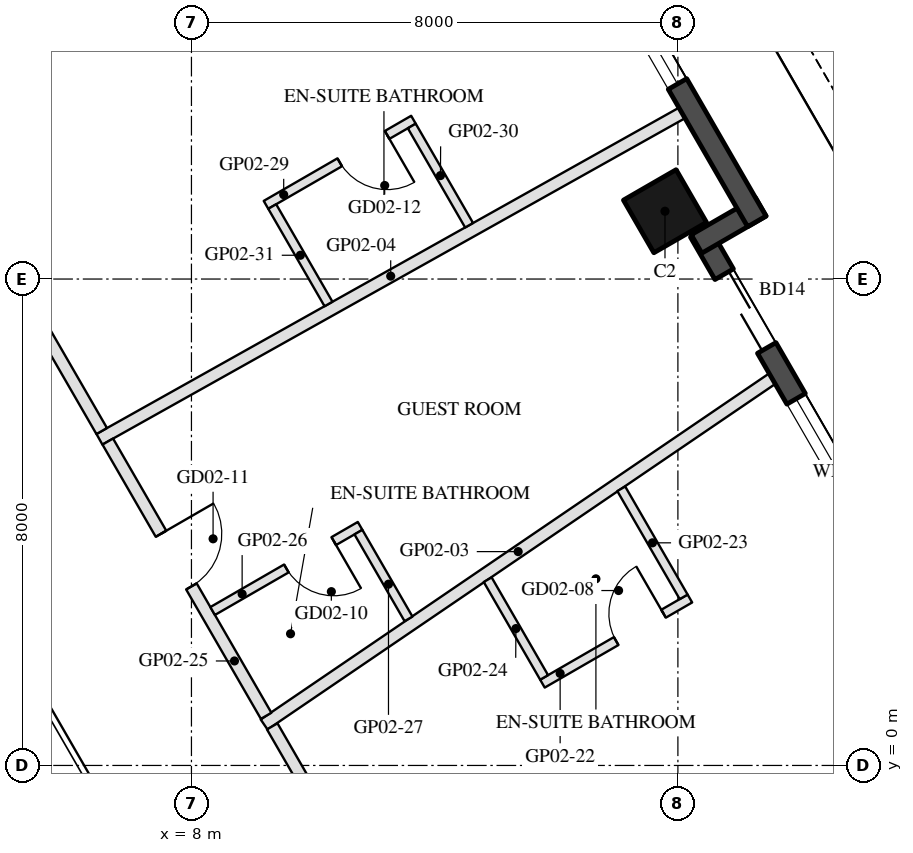
"""IFC4 building model, lengths in metres.
Left out: names, types, materials, properties, quantities, classifications, styles, units other than length and angle.
Written with IfcOpenShell. Run it as: python <this file> out.ifc"""

import sys

from ifc_helpers import new_model, si_unit, direction, frame, frame_2d, origin, origin_2d, place, context, subcontext, project, spatial, rectangle, hollow_rectangle, extrude, element, fill, save


model = new_model("IFC4")
c1 = context("Model", 3, precision=1e-05, world=origin(), true_north=direction((0.0, 1.0)))
c2 = subcontext(c1, "Body", "Model", "MODEL_VIEW")
j1 = project(units=[si_unit("LENGTHUNIT", "METRE"), si_unit("PLANEANGLEUNIT", "RADIAN")], contexts=[c1])
p1 = place(None, origin())
s1 = spatial("IfcSite", under=j1, at=p1, CompositionType="ELEMENT")
p2 = place(p1, origin())
s2 = spatial("IfcBuilding", under=s1, at=p2, CompositionType="ELEMENT")
p3 = place(p2, frame((0.0, 0.0, 57.6)))
s3 = spatial("IfcBuildingStorey", under=s2, at=p3, CompositionType="ELEMENT", Elevation=57.6)
p4 = place(p3, frame((15.788, 9.115, 0.0), z_axis=(0.0, 0.0, 1.0), x_axis=(-0.5, 0.866025403784, 0.0)))
e1 = element("IfcColumn", 1, at=p4, inside=s3, PredefinedType="COLUMN", context=c2, shape_type="SweptSolid", body=[
    extrude(hollow_rectangle(XDim=1.0, YDim=1.0, WallThickness=0.045, at=origin_2d()), origin(), (0.0, 0.0, 1.0), 3.7),
])
p5 = place(p3, frame((19.729, 2.938, 0.0), z_axis=(0.0, 0.0, 1.0), x_axis=(-0.499976430342, 0.866039011305, 0.0)))
e2 = element("IfcWall", 2, at=p5, inside=s3, PredefinedType="SOLIDWALL", context=c2, shape_type="SweptSolid", body=[
    extrude(rectangle(XDim=6.74, YDim=0.35, at=frame_2d((3.37, 0.0))), origin(), (0.0, 0.0, 1.0), 3.55),
])
p6 = place(p5, frame((0.77, 0.0, 0.3)))
e3 = element("IfcOpeningElement", 3, at=p6, cuts=e2, PredefinedType="OPENING", context=c2, shape_type="SweptSolid", body=[
    extrude(rectangle(XDim=2.8, YDim=2.65, at=frame_2d((1.4, 1.325))), frame((0.0, 0.185, 0.0), z_axis=(0.0, -1.0, 0.0), x_axis=(1.0, 0.0, 0.0)), (0.0, 0.0, 1.0), 0.37),
])
p7 = place(p5, frame((4.536, 0.0, 0.0)))
e4 = element("IfcOpeningElement", 4, at=p7, cuts=e2, PredefinedType="OPENING", context=c2, shape_type="SweptSolid", body=[
    extrude(rectangle(XDim=1.4, YDim=2.4, at=frame_2d((0.7, 1.2))), frame((0.0, 0.185, 0.0), z_axis=(0.0, -1.0, 0.0), x_axis=(1.0, 0.0, 0.0)), (0.0, 0.0, 1.0), 0.37),
])
p8 = place(p3, frame((16.306, 8.577, 0.0), z_axis=(0.0, 0.0, 1.0), x_axis=(0.866092288191, 0.499884134912, 0.0)))
e5 = element("IfcWall", 5, at=p8, inside=s3, PredefinedType="SOLIDWALL", context=c2, shape_type="SweptSolid", body=[
    extrude(rectangle(XDim=1.22, YDim=0.35, at=frame_2d((0.61, 0.0))), origin(), (0.0, 0.0, 1.0), 3.55),
])
p9 = place(p3, frame((17.299, 8.948, 0.0), z_axis=(0.0, 0.0, 1.0), x_axis=(-0.500010041276, 0.866019606374, 0.0)))
e6 = element("IfcWall", 6, at=p9, inside=s3, PredefinedType="SOLIDWALL", context=c2, shape_type="SweptSolid", body=[
    extrude(rectangle(XDim=9.7, YDim=0.35, at=frame_2d((4.85, 0.0))), origin(), (0.0, 0.0, 1.0), 3.55),
])
p10 = place(p9, frame((2.61, 0.0, 0.3)))
e7 = element("IfcOpeningElement", 7, at=p10, cuts=e6, PredefinedType="OPENING", context=c2, shape_type="SweptSolid", body=[
    extrude(rectangle(XDim=1.6, YDim=2.65, at=frame_2d((0.8, 1.325))), frame((0.0, 0.185, 0.0), z_axis=(0.0, -1.0, 0.0), x_axis=(1.0, 0.0, 0.0)), (0.0, 0.0, 1.0), 0.37),
])
p11 = place(p9, frame((4.949, 0.0, 0.3)))
e8 = element("IfcOpeningElement", 8, at=p11, cuts=e6, PredefinedType="OPENING", context=c2, shape_type="SweptSolid", body=[
    extrude(rectangle(XDim=3.0, YDim=2.65, at=frame_2d((1.5, 1.325))), frame((0.0, 0.185, 0.0), z_axis=(0.0, -1.0, 0.0), x_axis=(1.0, 0.0, 0.0)), (0.0, 0.0, 1.0), 0.37),
])
p12 = place(p3, frame((17.551, 6.361, 0.0), z_axis=(0.0, 0.0, 1.0), x_axis=(-0.826656859261, -0.562706350627, 0.0)))
e9 = element("IfcWall", 9, at=p12, inside=s3, PredefinedType="PARTITIONING", context=c2, shape_type="SweptSolid", body=[
    extrude(rectangle(XDim=10.108, YDim=0.2, at=frame_2d((5.054, 0.0))), origin(), (0.0, 0.0, 1.0), 2.95),
])
p13 = place(p3, frame((16.067, 10.731, 0.0), z_axis=(0.0, 0.0, 1.0), x_axis=(-0.872443451626, -0.488715074164, 0.0)))
e10 = element("IfcWall", 10, at=p13, inside=s3, PredefinedType="PARTITIONING", context=c2, shape_type="SweptSolid", body=[
    extrude(rectangle(XDim=10.981, YDim=0.2, at=frame_2d((5.49, 0.0))), origin(), (0.0, 0.0, 1.0), 2.96),
])
p14 = place(p3, frame((9.329, 0.643, 0.0), z_axis=(0.0, 0.0, 1.0), x_axis=(0.500001579811, -0.866024491678, 0.0)))
e11 = element("IfcWall", 11, at=p14, inside=s3, PredefinedType="PARTITIONING", context=c2, shape_type="SweptSolid", body=[
    extrude(rectangle(XDim=5.88, YDim=0.2, at=frame_2d((2.94, 0.0))), origin(), (0.0, 0.0, 1.0), 2.95),
])
p15 = place(p14, frame((2.44, 0.0, 0.0)))
e12 = element("IfcOpeningElement", 12, at=p15, cuts=e11, PredefinedType="OPENING", context=c2, shape_type="SweptSolid", body=[
    extrude(rectangle(XDim=1.0, YDim=2.1, at=frame_2d((0.5, 1.05))), frame((0.0, 0.11, 0.0), z_axis=(0.0, -1.0, 0.0), x_axis=(1.0, 0.0, 0.0)), (0.0, 0.0, 1.0), 0.22),
])
p16 = place(p3, frame((13.772, 1.345, 0.0), z_axis=(0.0, 0.0, 1.0), x_axis=(0.865996816683, 0.500049511043, 0.0)))
e13 = element("IfcWall", 13, at=p16, inside=s3, PredefinedType="PARTITIONING", context=c2, shape_type="SweptSolid", body=[
    extrude(rectangle(XDim=2.8, YDim=0.15, at=frame_2d((1.4, 0.0))), origin(), (0.0, 0.0, 1.0), 3.55),
])
p17 = place(p16, frame((1.4, 0.0, 0.0)))
e14 = element("IfcOpeningElement", 14, at=p17, cuts=e13, PredefinedType="OPENING", context=c2, shape_type="SweptSolid", body=[
    extrude(rectangle(XDim=0.9, YDim=2.1, at=frame_2d((0.45, 1.05))), frame((0.0, 0.085, 0.0), z_axis=(0.0, -1.0, 0.0), x_axis=(1.0, 0.0, 0.0)), (0.0, 0.0, 1.0), 0.17),
])
p18 = place(p3, frame((16.095, 2.773, 0.0), z_axis=(0.0, 0.0, 1.0), x_axis=(-0.499990189338, 0.866031067899, 0.0)))
e15 = element("IfcWall", 15, at=p18, inside=s3, PredefinedType="PARTITIONING", context=c2, shape_type="SweptSolid", body=[
    extrude(rectangle(XDim=2.052, YDim=0.15, at=frame_2d((1.026, 0.0))), origin(), (0.0, 0.0, 1.0), 2.95),
])
p19 = place(p3, frame((13.8, 1.448, 0.0), z_axis=(0.0, 0.0, 1.0), x_axis=(-0.499988210251, 0.866032210492, 0.0)))
e16 = element("IfcWall", 16, at=p19, inside=s3, PredefinedType="PARTITIONING", context=c2, shape_type="SweptSolid", body=[
    extrude(rectangle(XDim=1.855, YDim=0.15, at=frame_2d((0.928, 0.0))), origin(), (0.0, 0.0, 1.0), 2.95),
])
p20 = place(p3, frame((6.624, 5.327, 0.0), z_axis=(0.0, 0.0, 1.0), x_axis=(0.500015953014, -0.866016193112, 0.0)))
e17 = element("IfcWall", 17, at=p20, inside=s3, PredefinedType="PARTITIONING", context=c2, shape_type="SweptSolid", body=[
    extrude(rectangle(XDim=5.208, YDim=0.2, at=frame_2d((2.604, 0.0))), origin(), (0.0, 0.0, 1.0), 2.95),
])
p21 = place(p20, frame((1.751, 0.0, 0.0)))
e18 = element("IfcOpeningElement", 18, at=p21, cuts=e17, PredefinedType="OPENING", context=c2, shape_type="SweptSolid", body=[
    extrude(rectangle(XDim=1.0, YDim=2.1, at=frame_2d((0.5, 1.05))), frame((0.0, 0.11, 0.0), z_axis=(0.0, -1.0, 0.0), x_axis=(1.0, 0.0, 0.0)), (0.0, 0.0, 1.0), 0.22),
])
p22 = place(p3, frame((10.773, 3.94, 0.0), z_axis=(0.0, 0.0, 1.0), x_axis=(-0.866034573852, -0.49998411664, 0.0)))
e19 = element("IfcWall", 19, at=p22, inside=s3, PredefinedType="PARTITIONING", context=c2, shape_type="SweptSolid", body=[
    extrude(rectangle(XDim=2.8, YDim=0.15, at=frame_2d((1.4, 0.0))), origin(), (0.0, 0.0, 1.0), 3.55),
])
p23 = place(p22, frame((0.5, 0.0, 0.0)))
e20 = element("IfcOpeningElement", 20, at=p23, cuts=e19, PredefinedType="OPENING", context=c2, shape_type="SweptSolid", body=[
    extrude(rectangle(XDim=0.9, YDim=2.1, at=frame_2d((0.45, 1.05))), frame((0.0, 0.085, 0.0), z_axis=(0.0, -1.0, 0.0), x_axis=(1.0, 0.0, 0.0)), (0.0, 0.0, 1.0), 0.17),
])
p24 = place(p3, frame((11.57, 2.41, 0.0), z_axis=(0.0, 0.0, 1.0), x_axis=(-0.499931951619, 0.866064687971, 0.0)))
e21 = element("IfcWall", 21, at=p24, inside=s3, PredefinedType="PARTITIONING", context=c2, shape_type="SweptSolid", body=[
    extrude(rectangle(XDim=1.648, YDim=0.15, at=frame_2d((0.824, 0.0))), origin(), (0.0, 0.0, 1.0), 3.55),
])
p25 = place(p3, frame((2.281, 12.85, 0.0), z_axis=(0.0, 0.0, 1.0), x_axis=(0.499997198377, -0.866027021296, 0.0)))
e22 = element("IfcWall", 22, at=p25, inside=s3, PredefinedType="PARTITIONING", context=c2, shape_type="SweptSolid", body=[
    extrude(rectangle(XDim=8.487, YDim=0.2, at=frame_2d((4.243, 0.0))), origin(), (0.0, 0.0, 1.0), 2.95),
])
p26 = place(p25, frame((3.743, 0.0, 0.0)))
e23 = element("IfcOpeningElement", 23, at=p26, cuts=e22, PredefinedType="OPENING", context=c2, shape_type="SweptSolid", body=[
    extrude(rectangle(XDim=1.0, YDim=2.1, at=frame_2d((0.5, 1.05))), frame((0.0, 0.11, 0.0), z_axis=(0.0, -1.0, 0.0), x_axis=(1.0, 0.0, 0.0)), (0.0, 0.0, 1.0), 0.22),
])
p27 = place(p3, frame((11.651, 10.62, 0.0), z_axis=(0.0, 0.0, 1.0), x_axis=(-0.865996816683, -0.500049511043, 0.0)))
e24 = element("IfcWall", 24, at=p27, inside=s3, PredefinedType="PARTITIONING", context=c2, shape_type="SweptSolid", body=[
    extrude(rectangle(XDim=2.8, YDim=0.15, at=frame_2d((1.4, 0.0))), origin(), (0.0, 0.0, 1.0), 3.55),
])
p28 = place(p27, frame((0.5, 0.0, 0.0)))
e25 = element("IfcOpeningElement", 25, at=p28, cuts=e24, PredefinedType="OPENING", context=c2, shape_type="SweptSolid", body=[
    extrude(rectangle(XDim=0.9, YDim=2.1, at=frame_2d((0.45, 1.05))), frame((0.0, 0.085, 0.0), z_axis=(0.0, -1.0, 0.0), x_axis=(1.0, 0.0, 0.0)), (0.0, 0.0, 1.0), 0.17),
])
p29 = place(p3, frame((12.566, 8.885, 0.0), z_axis=(0.0, 0.0, 1.0), x_axis=(-0.499969057507, 0.866043267704, 0.0)))
e26 = element("IfcWall", 26, at=p29, inside=s3, PredefinedType="PARTITIONING", context=c2, shape_type="SweptSolid", body=[
    extrude(rectangle(XDim=1.885, YDim=0.15, at=frame_2d((0.943, 0.0))), origin(), (0.0, 0.0, 1.0), 3.55),
])
p30 = place(p3, frame((10.254, 7.59, 0.0), z_axis=(0.0, 0.0, 1.0), x_axis=(-0.499912756669, 0.866075767886, 0.0)))
e27 = element("IfcWall", 27, at=p30, inside=s3, PredefinedType="PARTITIONING", context=c2, shape_type="SweptSolid", body=[
    extrude(rectangle(XDim=1.851, YDim=0.15, at=frame_2d((0.925, 0.0))), origin(), (0.0, 0.0, 1.0), 3.55),
])
p31 = place(p6, origin())
e28 = element("IfcWindow", 28, at=p31, inside=s3, PartitioningType="SINGLE_PANEL", PredefinedType="WINDOW", context=c2, shape_type="SweptSolid", body=[
    extrude(rectangle(XDim=2.8, YDim=2.65, at=frame_2d((1.4, 1.325))), frame((0.0, 0.03, 0.0), z_axis=(0.0, -1.0, 0.0), x_axis=(1.0, 0.0, 0.0)), (0.0, 0.0, 1.0), 0.06),
])
fill(e3, e28)
p32 = place(p7, frame((1.4, 0.0, 0.0), z_axis=(0.0, 0.0, 1.0), x_axis=(-1.0, 0.0, 0.0)))
e29 = element("IfcDoor", 29, at=p32, inside=s3, OperationType="SLIDING_TO_LEFT", PredefinedType="DOOR", context=c2, shape_type="SweptSolid", body=[
    extrude(rectangle(XDim=1.4, YDim=2.4, at=frame_2d((0.7, 1.2))), frame((0.0, 0.025, 0.0), z_axis=(0.0, -1.0, 0.0), x_axis=(1.0, 0.0, 0.0)), (0.0, 0.0, 1.0), 0.05),
])
fill(e4, e29)
p33 = place(p10, origin())
e30 = element("IfcWindow", 30, at=p33, inside=s3, PartitioningType="SINGLE_PANEL", PredefinedType="WINDOW", context=c2, shape_type="SweptSolid", body=[
    extrude(rectangle(XDim=1.6, YDim=2.65, at=frame_2d((0.8, 1.325))), frame((0.0, 0.03, 0.0), z_axis=(0.0, -1.0, 0.0), x_axis=(1.0, 0.0, 0.0)), (0.0, 0.0, 1.0), 0.06),
])
fill(e7, e30)
p34 = place(p17, origin())
e31 = element("IfcDoor", 31, at=p34, inside=s3, OperationType="SINGLE_SWING_RIGHT", PredefinedType="DOOR", context=c2, shape_type="SweptSolid", body=[
    extrude(rectangle(XDim=0.9, YDim=2.1, at=frame_2d((0.45, 1.05))), frame((0.0, 0.025, 0.0), z_axis=(0.0, -1.0, 0.0), x_axis=(1.0, 0.0, 0.0)), (0.0, 0.0, 1.0), 0.05),
])
fill(e14, e31)
p35 = place(p23, origin())
e32 = element("IfcDoor", 32, at=p35, inside=s3, OperationType="SINGLE_SWING_LEFT", PredefinedType="DOOR", context=c2, shape_type="SweptSolid", body=[
    extrude(rectangle(XDim=0.9, YDim=2.1, at=frame_2d((0.45, 1.05))), frame((0.0, 0.025, 0.0), z_axis=(0.0, -1.0, 0.0), x_axis=(1.0, 0.0, 0.0)), (0.0, 0.0, 1.0), 0.05),
])
fill(e20, e32)
p36 = place(p21, origin())
e33 = element("IfcDoor", 33, at=p36, inside=s3, OperationType="SINGLE_SWING_LEFT", PredefinedType="DOOR", context=c2, shape_type="SweptSolid", body=[
    extrude(rectangle(XDim=1.0, YDim=2.1, at=frame_2d((0.5, 1.05))), frame((0.0, 0.025, 0.0), z_axis=(0.0, -1.0, 0.0), x_axis=(1.0, 0.0, 0.0)), (0.0, 0.0, 1.0), 0.05),
])
fill(e18, e33)
p37 = place(p28, origin())
e34 = element("IfcDoor", 34, at=p37, inside=s3, OperationType="SINGLE_SWING_LEFT", PredefinedType="DOOR", context=c2, shape_type="SweptSolid", body=[
    extrude(rectangle(XDim=0.9, YDim=2.1, at=frame_2d((0.45, 1.05))), frame((0.0, 0.025, 0.0), z_axis=(0.0, -1.0, 0.0), x_axis=(1.0, 0.0, 0.0)), (0.0, 0.0, 1.0), 0.05),
])
fill(e25, e34)
save(model, sys.argv[1])
